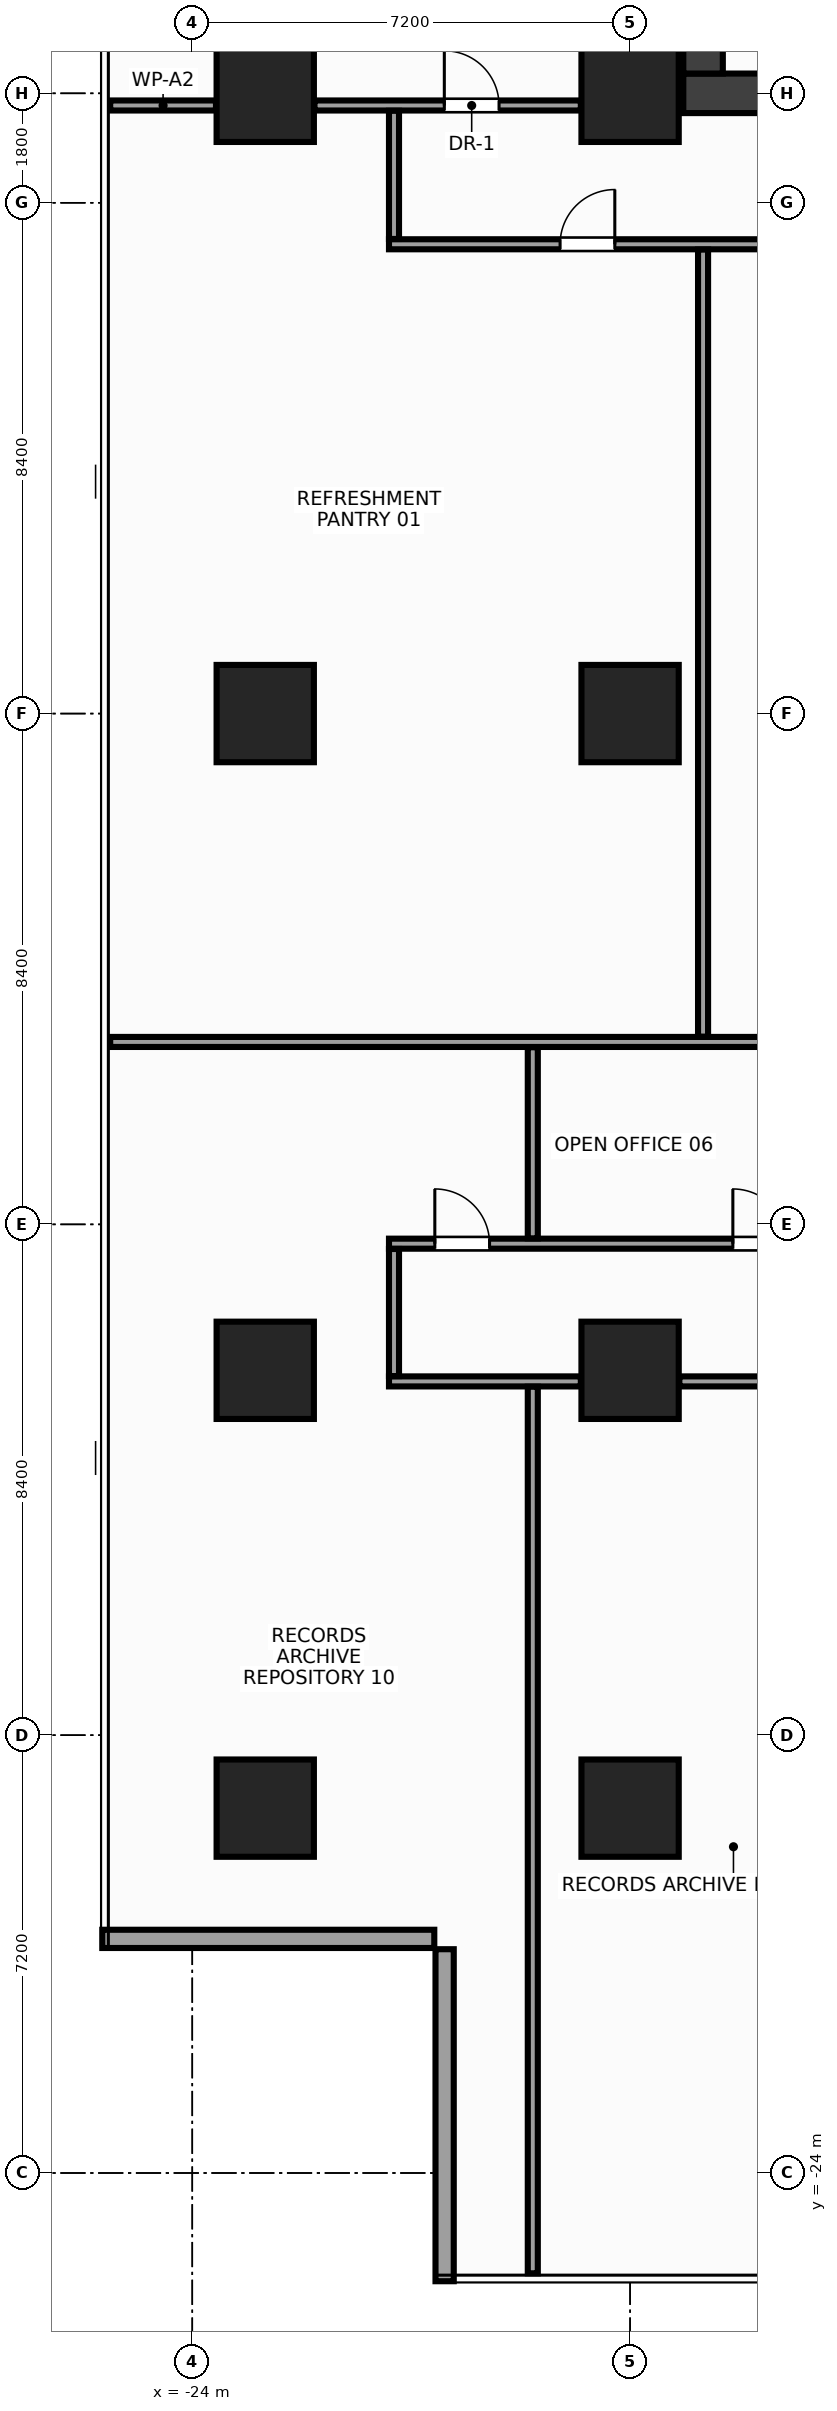
"""IFC4 building model, lengths in metres.
Left out: names, types, materials, properties, quantities, classifications, styles, units other than length and angle.
Written with IfcOpenShell. Run it as: python <this file> out.ifc"""

import sys

from ifc_helpers import new_model, si_unit, direction, frame, frame_2d, origin, origin_2d, place, context, subcontext, project, spatial, rectangle, extrude, source, transform, mapped, element, fill, save


model = new_model("IFC4")
c1 = context("Model", 3, precision=1e-05, world=origin(), true_north=direction((0.0, 1.0)))
c2 = subcontext(c1, "Body", "Model", "MODEL_VIEW")
j1 = project(units=[si_unit("LENGTHUNIT", "METRE"), si_unit("PLANEANGLEUNIT", "RADIAN")], contexts=[c1])
p1 = place(None, origin())
s1 = spatial("IfcSite", under=j1, at=p1, CompositionType="ELEMENT")
p2 = place(p1, origin())
s2 = spatial("IfcBuilding", under=s1, at=p2, CompositionType="ELEMENT")
p3 = place(p2, frame((0.0, 0.0, 102.8)))
s3 = spatial("IfcBuildingStorey", under=s2, at=p3, CompositionType="ELEMENT", Elevation=102.8)
m1 = source(origin(), c2, "Body", "SweptSolid", [
    extrude(rectangle(XDim=31.85, YDim=0.65, at=frame_2d((15.925, 0.0))), origin(), (0.0, 0.0, 1.0), 3.6),
])
p4 = place(p3, frame((-15.925, 10.2, 0.0), z_axis=(0.0, 0.0, 1.0), x_axis=(1.0, 0.0, 0.0)))
e1 = element("IfcWall", 1, at=p4, inside=s3, PredefinedType="SHEAR", context=c2, shape_type="MappedRepresentation", body=[
    mapped(m1, transform((0.0, 0.0, 0.0), x_axis=(1.0, 0.0, 0.0), y_axis=(0.0, 1.0, 0.0), z_axis=(0.0, 0.0, 1.0), scale=1.0)),
])
p5 = place(p4, frame((1.775, 0.0, 0.0)))
e2 = element("IfcOpeningElement", 2, at=p5, cuts=e1, PredefinedType="OPENING", context=c2, shape_type="SweptSolid", body=[
    extrude(rectangle(XDim=1.6, YDim=2.15, at=frame_2d((0.8, 1.075))), frame((0.0, 0.337, 0.0), z_axis=(0.0, -1.0, 0.0), x_axis=(1.0, 0.0, 0.0)), (0.0, 0.0, 1.0), 0.674),
])
p6 = place(p4, frame((28.475, 0.0, 0.0)))
e3 = element("IfcOpeningElement", 3, at=p6, cuts=e1, PredefinedType="OPENING", context=c2, shape_type="SweptSolid", body=[
    extrude(rectangle(XDim=1.6, YDim=2.15, at=frame_2d((0.8, 1.075))), frame((0.0, 0.337, 0.0), z_axis=(0.0, -1.0, 0.0), x_axis=(1.0, 0.0, 0.0)), (0.0, 0.0, 1.0), 0.674),
])
p7 = place(p4, frame((15.175, 0.0, 0.0)))
e4 = element("IfcOpeningElement", 4, at=p7, cuts=e1, PredefinedType="OPENING", context=c2, shape_type="SweptSolid", body=[
    extrude(rectangle(XDim=1.5, YDim=2.2, at=frame_2d((0.75, 1.1))), frame((0.0, 0.337, 0.0), z_axis=(0.0, -1.0, 0.0), x_axis=(1.0, 0.0, 0.0)), (0.0, 0.0, 1.0), 0.674),
])
m2 = source(origin(), c2, "Body", "SweptSolid", [
    extrude(rectangle(XDim=12.95, YDim=0.65, at=frame_2d((6.475, 0.0))), origin(), (0.0, 0.0, 1.0), 3.6),
])
p8 = place(p3, frame((-15.6, 10.525, 0.0), z_axis=(0.0, 0.0, 1.0), x_axis=(0.0, 1.0, 0.0)))
e5 = element("IfcWall", 5, at=p8, inside=s3, PredefinedType="SHEAR", context=c2, shape_type="MappedRepresentation", body=[
    mapped(m2, transform((0.0, 0.0, 0.0), x_axis=(1.0, 0.0, 0.0), y_axis=(0.0, 1.0, 0.0), z_axis=(0.0, 0.0, 1.0), scale=1.0)),
])
m3 = source(origin(), c2, "Body", "SweptSolid", [
    extrude(rectangle(XDim=1.6, YDim=1.6, at=origin_2d()), origin(), (0.0, 0.0, 1.0), 3.6),
])
for number, where, z_axis, x_axis in (
    (6, (-16.8, -18.0, 0.0), (0.0, 0.0, 1.0), (1.0, 0.0, 0.0)),
    (7, (-16.8, -10.8, 0.0), (0.0, 0.0, 1.0), (1.0, 0.0, 0.0)),
    (8, (-16.8, 0.0, 0.0), (0.0, 0.0, 1.0), (1.0, 0.0, 0.0)),
    (9, (-16.8, 10.2, 0.0), (0.0, 0.0, 1.0), (1.0, 0.0, 0.0)),
    (10, (-22.8, -18.0, 0.0), (0.0, 0.0, 1.0), (1.0, 0.0, 0.0)),
    (11, (-22.8, -10.8, 0.0), (0.0, 0.0, 1.0), (1.0, 0.0, 0.0)),
    (12, (-22.8, 0.0, 0.0), (0.0, 0.0, 1.0), (1.0, 0.0, 0.0)),
    (13, (-22.8, 10.2, 0.0), (0.0, 0.0, 1.0), (1.0, 0.0, 0.0)),
):
    element("IfcColumn", number, at=place(p3, frame(where, z_axis=z_axis, x_axis=x_axis)), inside=s3, PredefinedType="COLUMN", context=c2, shape_type="MappedRepresentation", body=[
        mapped(m3, transform((0.0, 0.0, 0.0), x_axis=(1.0, 0.0, 0.0), y_axis=(0.0, 1.0, 0.0), z_axis=(0.0, 0.0, 1.0), scale=1.0)),
    ])
m4 = source(origin(), c2, "Body", "SweptSolid", [
    extrude(rectangle(XDim=5.46, YDim=0.3, at=frame_2d((2.73, 0.0))), origin(), (0.0, 0.0, 1.0), 2.74),
])
for number, where, z_axis, x_axis in (
    (14, (-25.48, -20.15, 0.0), (0.0, 0.0, 1.0), (1.0, 0.0, 0.0)),
    (15, (-19.85, -20.32, 0.0), (0.0, 0.0, 1.0), (0.0, -1.0, 0.0)),
):
    element("IfcWall", number, at=place(p3, frame(where, z_axis=z_axis, x_axis=x_axis)), inside=s3, PredefinedType="STANDARD", context=c2, shape_type="MappedRepresentation", body=[
        mapped(m4, transform((0.0, 0.0, 0.0), x_axis=(1.0, 0.0, 0.0), y_axis=(0.0, 1.0, 0.0), z_axis=(0.0, 0.0, 1.0), scale=1.0)),
    ])
m5 = source(origin(), c2, "Body", "SweptSolid", [
    extrude(rectangle(XDim=1.74, YDim=0.165, at=frame_2d((0.87, 0.0))), origin(), (0.0, 0.0, 1.0), 3.36),
])
p9 = place(p3, frame((-25.35, 10.0, 0.0), z_axis=(0.0, 0.0, 1.0), x_axis=(1.0, 0.0, 0.0)))
e16 = element("IfcWall", 16, at=p9, inside=s3, PredefinedType="PARTITIONING", context=c2, shape_type="MappedRepresentation", body=[
    mapped(m5, transform((0.0, 0.0, 0.0), x_axis=(1.0, 0.0, 0.0), y_axis=(0.0, 1.0, 0.0), z_axis=(0.0, 0.0, 1.0), scale=1.0)),
])
m6 = source(origin(), c2, "Body", "SweptSolid", [
    extrude(rectangle(XDim=4.38, YDim=0.165, at=frame_2d((2.19, 0.0))), origin(), (0.0, 0.0, 1.0), 2.745),
])
p10 = place(p3, frame((-21.99, 10.0, 0.0), z_axis=(0.0, 0.0, 1.0), x_axis=(1.0, 0.0, 0.0)))
e17 = element("IfcWall", 17, at=p10, inside=s3, PredefinedType="PARTITIONING", context=c2, shape_type="MappedRepresentation", body=[
    mapped(m6, transform((0.0, 0.0, 0.0), x_axis=(1.0, 0.0, 0.0), y_axis=(0.0, 1.0, 0.0), z_axis=(0.0, 0.0, 1.0), scale=1.0)),
])
p11 = place(p10, frame((2.135, 0.0, 0.0)))
e18 = element("IfcOpeningElement", 18, at=p11, cuts=e17, PredefinedType="OPENING", context=c2, shape_type="SweptSolid", body=[
    extrude(rectangle(XDim=0.9, YDim=2.15, at=frame_2d((0.45, 1.075))), frame((0.0, 0.094, 0.0), z_axis=(0.0, -1.0, 0.0), x_axis=(1.0, 0.0, 0.0)), (0.0, 0.0, 1.0), 0.189),
])
m7 = source(origin(), c2, "Body", "SweptSolid", [
    extrude(rectangle(XDim=16.8, YDim=0.165, at=frame_2d((8.4, 0.0))), origin(), (0.0, 0.0, 1.0), 2.745),
])
p12 = place(p3, frame((-20.765, 7.718, 0.0), z_axis=(0.0, 0.0, 1.0), x_axis=(1.0, 0.0, 0.0)))
e19 = element("IfcWall", 19, at=p12, inside=s3, PredefinedType="PARTITIONING", context=c2, shape_type="MappedRepresentation", body=[
    mapped(m7, transform((0.0, 0.0, 0.0), x_axis=(1.0, 0.0, 0.0), y_axis=(0.0, 1.0, 0.0), z_axis=(0.0, 0.0, 1.0), scale=1.0)),
])
p13 = place(p12, frame((2.814, 0.0, 0.0)))
e20 = element("IfcOpeningElement", 20, at=p13, cuts=e19, PredefinedType="OPENING", context=c2, shape_type="SweptSolid", body=[
    extrude(rectangle(XDim=0.9, YDim=2.15, at=frame_2d((0.45, 1.075))), frame((0.0, 0.094, 0.0), z_axis=(0.0, -1.0, 0.0), x_axis=(1.0, 0.0, 0.0)), (0.0, 0.0, 1.0), 0.189),
])
p14 = place(p12, frame((10.514, 0.0, 0.0)))
e21 = element("IfcOpeningElement", 21, at=p14, cuts=e19, PredefinedType="OPENING", context=c2, shape_type="SweptSolid", body=[
    extrude(rectangle(XDim=0.9, YDim=2.15, at=frame_2d((0.45, 1.075))), frame((0.0, 0.094, 0.0), z_axis=(0.0, -1.0, 0.0), x_axis=(1.0, 0.0, 0.0)), (0.0, 0.0, 1.0), 0.189),
])
p15 = place(p3, frame((-20.765, -8.718, 0.0), z_axis=(0.0, 0.0, 1.0), x_axis=(1.0, 0.0, 0.0)))
e22 = element("IfcWall", 22, at=p15, inside=s3, PredefinedType="PARTITIONING", context=c2, shape_type="MappedRepresentation", body=[
    mapped(m7, transform((0.0, 0.0, 0.0), x_axis=(1.0, 0.0, 0.0), y_axis=(0.0, 1.0, 0.0), z_axis=(0.0, 0.0, 1.0), scale=1.0)),
])
p16 = place(p15, frame((5.655, 0.0, 0.0)))
e23 = element("IfcOpeningElement", 23, at=p16, cuts=e22, PredefinedType="OPENING", context=c2, shape_type="SweptSolid", body=[
    extrude(rectangle(XDim=0.9, YDim=2.15, at=frame_2d((0.45, 1.075))), frame((0.0, 0.094, 0.0), z_axis=(0.0, -1.0, 0.0), x_axis=(1.0, 0.0, 0.0)), (0.0, 0.0, 1.0), 0.189),
])
p17 = place(p15, frame((12.634, 0.0, 0.0)))
e24 = element("IfcOpeningElement", 24, at=p17, cuts=e22, PredefinedType="OPENING", context=c2, shape_type="SweptSolid", body=[
    extrude(rectangle(XDim=0.9, YDim=2.15, at=frame_2d((0.45, 1.075))), frame((0.0, 0.094, 0.0), z_axis=(0.0, -1.0, 0.0), x_axis=(1.0, 0.0, 0.0)), (0.0, 0.0, 1.0), 0.189),
])
p18 = place(p15, frame((0.754, 0.0, 0.0)))
e25 = element("IfcOpeningElement", 25, at=p18, cuts=e22, PredefinedType="OPENING", context=c2, shape_type="SweptSolid", body=[
    extrude(rectangle(XDim=0.9, YDim=2.15, at=frame_2d((0.45, 1.075))), frame((0.0, 0.094, 0.0), z_axis=(0.0, -1.0, 0.0), x_axis=(1.0, 0.0, 0.0)), (0.0, 0.0, 1.0), 0.189),
])
m8 = source(origin(), c2, "Body", "SweptSolid", [
    extrude(rectangle(XDim=3.155, YDim=0.165, at=frame_2d((1.577, 0.0))), origin(), (0.0, 0.0, 1.0), 2.745),
])
p19 = place(p3, frame((-20.765, -10.982, 0.0), z_axis=(0.0, 0.0, 1.0), x_axis=(1.0, 0.0, 0.0)))
e26 = element("IfcWall", 26, at=p19, inside=s3, PredefinedType="PARTITIONING", context=c2, shape_type="MappedRepresentation", body=[
    mapped(m8, transform((0.0, 0.0, 0.0), x_axis=(1.0, 0.0, 0.0), y_axis=(0.0, 1.0, 0.0), z_axis=(0.0, 0.0, 1.0), scale=1.0)),
])
m9 = source(origin(), c2, "Body", "SweptSolid", [
    extrude(rectangle(XDim=7.08, YDim=0.165, at=frame_2d((3.54, 0.0))), origin(), (0.0, 0.0, 1.0), 2.745),
])
p20 = place(p3, frame((-15.99, -10.982, 0.0), z_axis=(0.0, 0.0, 1.0), x_axis=(1.0, 0.0, 0.0)))
e27 = element("IfcWall", 27, at=p20, inside=s3, PredefinedType="PARTITIONING", context=c2, shape_type="MappedRepresentation", body=[
    mapped(m9, transform((0.0, 0.0, 0.0), x_axis=(1.0, 0.0, 0.0), y_axis=(0.0, 1.0, 0.0), z_axis=(0.0, 0.0, 1.0), scale=1.0)),
])
p21 = place(p20, frame((1.664, 0.0, 0.0)))
e28 = element("IfcOpeningElement", 28, at=p21, cuts=e27, PredefinedType="OPENING", context=c2, shape_type="SweptSolid", body=[
    extrude(rectangle(XDim=0.9, YDim=2.15, at=frame_2d((0.45, 1.075))), frame((0.0, 0.094, 0.0), z_axis=(0.0, -1.0, 0.0), x_axis=(1.0, 0.0, 0.0)), (0.0, 0.0, 1.0), 0.189),
])
p22 = place(p20, frame((4.946, 0.0, 0.0)))
e29 = element("IfcOpeningElement", 29, at=p22, cuts=e27, PredefinedType="OPENING", context=c2, shape_type="SweptSolid", body=[
    extrude(rectangle(XDim=0.9, YDim=2.15, at=frame_2d((0.45, 1.075))), frame((0.0, 0.094, 0.0), z_axis=(0.0, -1.0, 0.0), x_axis=(1.0, 0.0, 0.0)), (0.0, 0.0, 1.0), 0.189),
])
m10 = source(origin(), c2, "Body", "SweptSolid", [
    extrude(rectangle(XDim=2.108, YDim=0.165, at=frame_2d((1.054, 0.0))), origin(), (0.0, 0.0, 1.0), 3.36),
])
p23 = place(p3, frame((-20.683, 7.805, 0.0), z_axis=(0.0, 0.0, 1.0), x_axis=(0.0, 1.0, 0.0)))
e30 = element("IfcWall", 30, at=p23, inside=s3, PredefinedType="PARTITIONING", context=c2, shape_type="MappedRepresentation", body=[
    mapped(m10, transform((0.0, 0.0, 0.0), x_axis=(1.0, 0.0, 0.0), y_axis=(0.0, 1.0, 0.0), z_axis=(0.0, 0.0, 1.0), scale=1.0)),
])
m11 = source(origin(), c2, "Body", "SweptSolid", [
    extrude(rectangle(XDim=2.09, YDim=0.165, at=frame_2d((1.045, 0.0))), origin(), (0.0, 0.0, 1.0), 3.36),
])
p24 = place(p3, frame((-20.683, -10.895, 0.0), z_axis=(0.0, 0.0, 1.0), x_axis=(0.0, 1.0, 0.0)))
e31 = element("IfcWall", 31, at=p24, inside=s3, PredefinedType="PARTITIONING", context=c2, shape_type="MappedRepresentation", body=[
    mapped(m11, transform((0.0, 0.0, 0.0), x_axis=(1.0, 0.0, 0.0), y_axis=(0.0, 1.0, 0.0), z_axis=(0.0, 0.0, 1.0), scale=1.0)),
])
m12 = source(origin(), c2, "Body", "SweptSolid", [
    extrude(rectangle(XDim=21.38, YDim=0.165, at=frame_2d((10.69, 0.0))), origin(), (0.0, 0.0, 1.0), 2.745),
])
p25 = place(p3, frame((-25.35, -5.4, 0.0), z_axis=(0.0, 0.0, 1.0), x_axis=(1.0, 0.0, 0.0)))
e32 = element("IfcWall", 32, at=p25, inside=s3, PredefinedType="PARTITIONING", context=c2, shape_type="MappedRepresentation", body=[
    mapped(m12, transform((0.0, 0.0, 0.0), x_axis=(1.0, 0.0, 0.0), y_axis=(0.0, 1.0, 0.0), z_axis=(0.0, 0.0, 1.0), scale=1.0)),
])
m13 = source(origin(), c2, "Body", "SweptSolid", [
    extrude(rectangle(XDim=12.942, YDim=0.165, at=frame_2d((6.471, 0.0))), origin(), (0.0, 0.0, 1.0), 2.645),
])
p26 = place(p3, frame((-15.6, -5.312, 0.0), z_axis=(0.0, 0.0, 1.0), x_axis=(0.0, 1.0, 0.0)))
e33 = element("IfcWall", 33, at=p26, inside=s3, PredefinedType="PARTITIONING", context=c2, shape_type="MappedRepresentation", body=[
    mapped(m13, transform((0.0, 0.0, 0.0), x_axis=(1.0, 0.0, 0.0), y_axis=(0.0, 1.0, 0.0), z_axis=(0.0, 0.0, 1.0), scale=1.0)),
])
m14 = source(origin(), c2, "Body", "SweptSolid", [
    extrude(rectangle(XDim=14.58, YDim=0.165, at=frame_2d((7.29, 0.0))), origin(), (0.0, 0.0, 1.0), 2.745),
])
p27 = place(p3, frame((-18.4, -25.65, 0.0), z_axis=(0.0, 0.0, 1.0), x_axis=(0.0, 1.0, 0.0)))
e34 = element("IfcWall", 34, at=p27, inside=s3, PredefinedType="PARTITIONING", context=c2, shape_type="MappedRepresentation", body=[
    mapped(m14, transform((0.0, 0.0, 0.0), x_axis=(1.0, 0.0, 0.0), y_axis=(0.0, 1.0, 0.0), z_axis=(0.0, 0.0, 1.0), scale=1.0)),
])
m15 = source(origin(), c2, "Body", "SweptSolid", [
    extrude(rectangle(XDim=3.142, YDim=0.165, at=frame_2d((1.571, 0.0))), origin(), (0.0, 0.0, 1.0), 3.36),
])
p28 = place(p3, frame((-18.4, -8.63, 0.0), z_axis=(0.0, 0.0, 1.0), x_axis=(0.0, 1.0, 0.0)))
e35 = element("IfcWall", 35, at=p28, inside=s3, PredefinedType="PARTITIONING", context=c2, shape_type="MappedRepresentation", body=[
    mapped(m15, transform((0.0, 0.0, 0.0), x_axis=(1.0, 0.0, 0.0), y_axis=(0.0, 1.0, 0.0), z_axis=(0.0, 0.0, 1.0), scale=1.0)),
])
m16 = source(origin(), c2, "Body", "SweptSolid", [
    extrude(rectangle(XDim=0.9, YDim=2.15, at=frame_2d((0.45, 1.075))), frame((0.0, 0.025, 0.0), z_axis=(0.0, -1.0, 0.0), x_axis=(1.0, 0.0, 0.0)), (0.0, 0.0, 1.0), 0.05),
])
p29 = place(p11, origin())
e36 = element("IfcDoor", 36, at=p29, inside=s3, OperationType="SINGLE_SWING_LEFT", PredefinedType="DOOR", context=c2, shape_type="MappedRepresentation", body=[
    mapped(m16, transform((0.0, 0.0, 0.0), x_axis=(1.0, 0.0, 0.0), y_axis=(0.0, 1.0, 0.0), z_axis=(0.0, 0.0, 1.0), scale=1.0)),
])
fill(e18, e36)
p30 = place(p13, origin())
e37 = element("IfcDoor", 37, at=p30, inside=s3, OperationType="SINGLE_SWING_RIGHT", PredefinedType="DOOR", context=c2, shape_type="MappedRepresentation", body=[
    mapped(m16, transform((0.0, 0.0, 0.0), x_axis=(1.0, 0.0, 0.0), y_axis=(0.0, 1.0, 0.0), z_axis=(0.0, 0.0, 1.0), scale=1.0)),
])
fill(e20, e37)
p31 = place(p16, origin())
e38 = element("IfcDoor", 38, at=p31, inside=s3, OperationType="SINGLE_SWING_LEFT", PredefinedType="DOOR", context=c2, shape_type="MappedRepresentation", body=[
    mapped(m16, transform((0.0, 0.0, 0.0), x_axis=(1.0, 0.0, 0.0), y_axis=(0.0, 1.0, 0.0), z_axis=(0.0, 0.0, 1.0), scale=1.0)),
])
fill(e23, e38)
p32 = place(p18, origin())
e39 = element("IfcDoor", 39, at=p32, inside=s3, OperationType="SINGLE_SWING_LEFT", PredefinedType="DOOR", context=c2, shape_type="MappedRepresentation", body=[
    mapped(m16, transform((0.0, 0.0, 0.0), x_axis=(1.0, 0.0, 0.0), y_axis=(0.0, 1.0, 0.0), z_axis=(0.0, 0.0, 1.0), scale=1.0)),
])
fill(e25, e39)
save(model, sys.argv[1])
